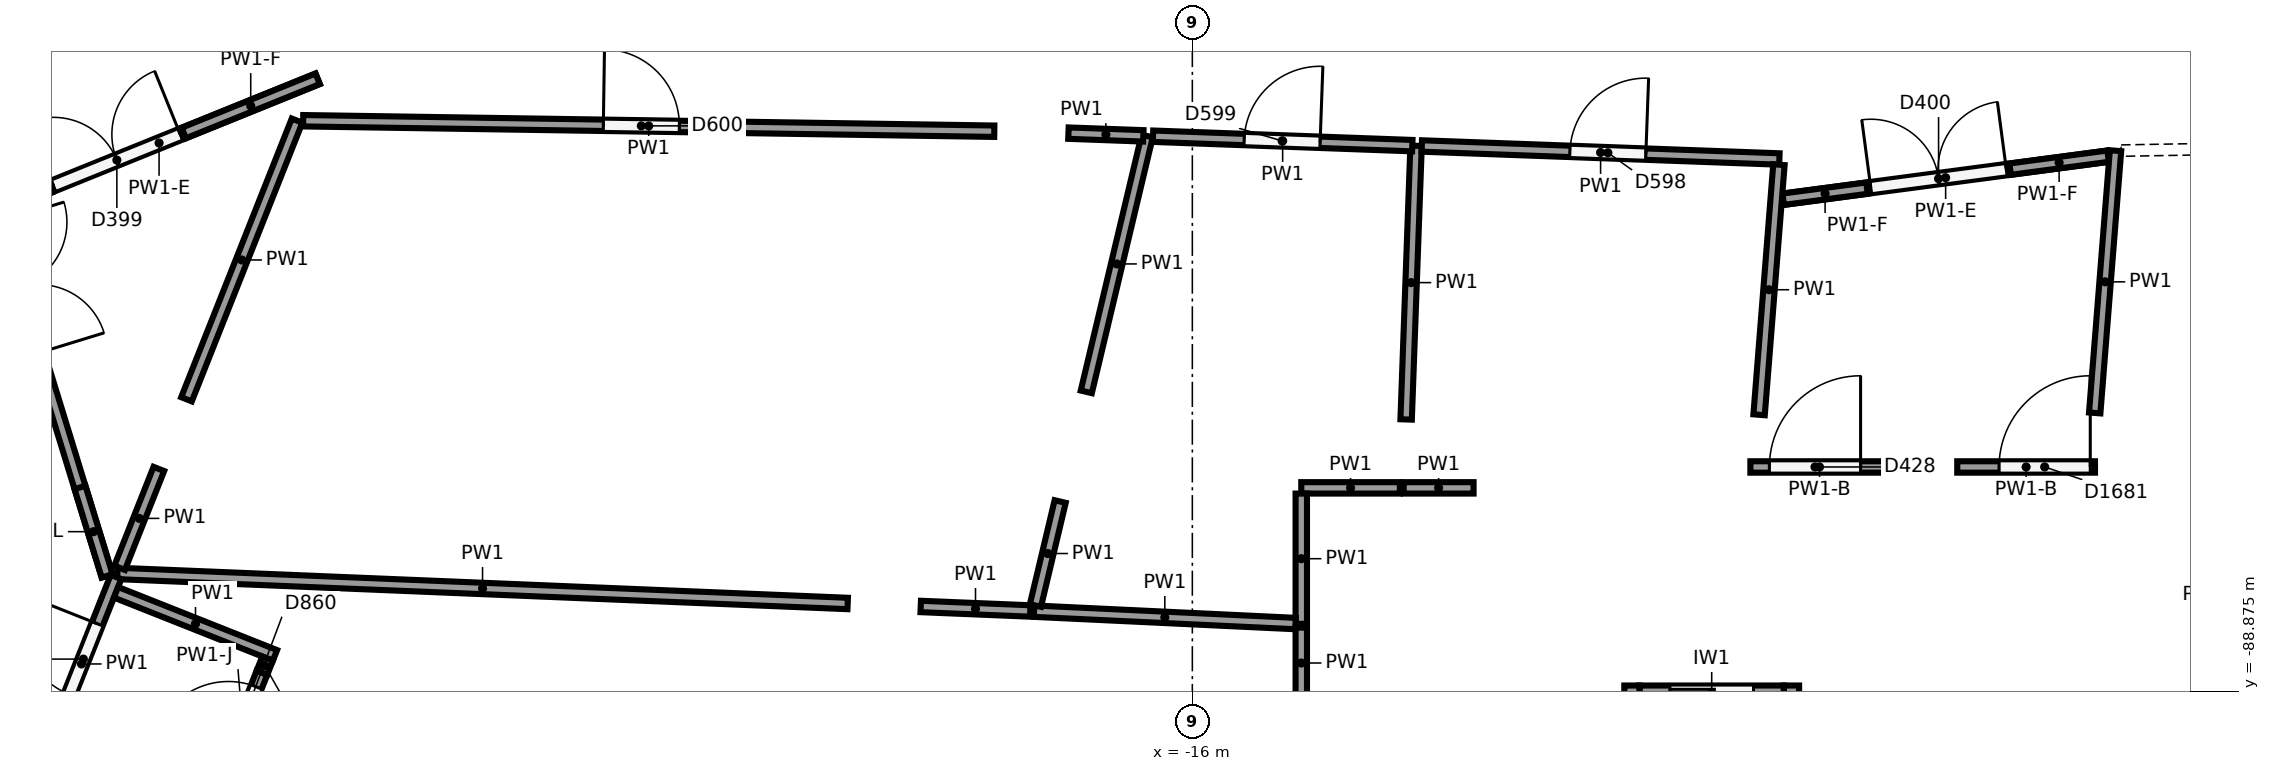
"""IFC4 building model, lengths in metres.
Left out: names, types, materials, properties, quantities, classifications, styles, units other than length and angle.
Written with IfcOpenShell. Run it as: python <this file> out.ifc"""

import sys

from ifc_helpers import new_model, si_unit, direction, frame, frame_2d, origin, origin_2d, place, context, subcontext, project, spatial, rectangle, circle, extrude, element, fill, save


model = new_model("IFC4")
c1 = context("Model", 3, precision=1e-05, world=origin(), true_north=direction((0.0, 1.0)))
c2 = subcontext(c1, "Body", "Model", "MODEL_VIEW")
j1 = project(units=[si_unit("LENGTHUNIT", "METRE"), si_unit("PLANEANGLEUNIT", "RADIAN")], contexts=[c1])
p1 = place(None, origin())
s1 = spatial("IfcSite", under=j1, at=p1, CompositionType="ELEMENT")
p2 = place(p1, origin())
s2 = spatial("IfcBuilding", under=s1, at=p2, CompositionType="ELEMENT")
p3 = place(p2, origin())
s3 = spatial("IfcBuildingStorey", under=s2, at=p3, CompositionType="ELEMENT", Elevation=0.0)
for number, where, z_axis, x_axis in (
    (1, (-19.119, -85.698, 0.0), (0.0, 0.0, 1.0), (1.0, 0.0, 0.0)),
    (2, (-6.387, -85.877, 0.0), (0.0, 0.0, 1.0), (1.0, 0.0, 0.0)),
):
    element("IfcColumn", number, at=place(p3, frame(where, z_axis=z_axis, x_axis=x_axis)), inside=s3, PredefinedType="COLUMN", context=c2, shape_type="SweptSolid", body=[
        extrude(circle(Radius=0.4, at=origin_2d()), origin(), (0.0, 0.0, 1.0), 6.5),
    ])
for number, where, z_axis, x_axis in (
    (3, (-10.217, -91.8, 0.0), (0.0, 0.0, 1.0), (0.0, 1.0, 0.0)),
    (4, (-8.117, -91.8, 0.0), (0.0, 0.0, 1.0), (0.0, 1.0, 0.0)),
):
    element("IfcWall", number, at=place(p3, frame(where, z_axis=z_axis, x_axis=x_axis)), inside=s3, PredefinedType="SHEAR", context=c2, shape_type="SweptSolid", body=[
        extrude(rectangle(XDim=3.0, YDim=0.2, at=frame_2d((1.5, 0.0))), origin(), (0.0, 0.0, 1.0), 6.15),
    ])
p4 = place(p3, frame((-10.117, -88.9, 0.0), z_axis=(0.0, 0.0, 1.0), x_axis=(1.0, 0.0, 0.0)))
e5 = element("IfcWall", 5, at=p4, inside=s3, PredefinedType="SHEAR", context=c2, shape_type="SweptSolid", body=[
    extrude(rectangle(XDim=1.9, YDim=0.2, at=frame_2d((0.95, 0.0))), origin(), (0.0, 0.0, 1.0), 6.15),
])
p5 = place(p4, frame((0.4, 0.0, 0.0)))
e6 = element("IfcOpeningElement", 6, at=p5, cuts=e5, PredefinedType="OPENING", context=c2, shape_type="SweptSolid", body=[
    extrude(rectangle(XDim=1.1, YDim=2.1, at=frame_2d((0.55, 1.05))), frame((0.0, 0.11, 0.0), z_axis=(0.0, -1.0, 0.0), x_axis=(1.0, 0.0, 0.0)), (0.0, 0.0, 1.0), 0.22),
])
p6 = place(p3, frame((-13.187, -85.3, 0.0), z_axis=(0.0, 0.0, 1.0), x_axis=(0.036322391441, 0.999340124222, 0.0)))
e7 = element("IfcWall", 7, at=p6, inside=s3, PredefinedType="PARTITIONING", context=c2, shape_type="SweptSolid", body=[
    extrude(rectangle(XDim=3.603, YDim=0.15, at=frame_2d((1.801, 0.0))), origin(), (0.0, 0.0, 1.0), 6.15),
])
p7 = place(p3, frame((-12.981, -81.702, 0.0), z_axis=(0.0, 0.0, 1.0), x_axis=(0.999339121267, -0.036349975301, 0.0)))
e8 = element("IfcWall", 8, at=p7, inside=s3, PredefinedType="PARTITIONING", context=c2, shape_type="SweptSolid", body=[
    extrude(rectangle(XDim=4.708, YDim=0.15, at=frame_2d((2.354, 0.0))), origin(), (0.0, 0.0, 1.0), 6.15),
])
p8 = place(p7, frame((1.95, 0.0, 0.0)))
e9 = element("IfcOpeningElement", 9, at=p8, cuts=e8, PredefinedType="OPENING", context=c2, shape_type="SweptSolid", body=[
    extrude(rectangle(XDim=1.0, YDim=2.1, at=frame_2d((0.5, 1.05))), frame((0.0, 0.085, 0.0), z_axis=(0.0, -1.0, 0.0), x_axis=(1.0, 0.0, 0.0)), (0.0, 0.0, 1.0), 0.17),
])
p9 = place(p3, frame((-8.282, -81.948, 0.0), z_axis=(0.0, 0.0, 1.0), x_axis=(-0.079066134404, -0.996869372782, 0.0)))
e10 = element("IfcWall", 10, at=p9, inside=s3, PredefinedType="PARTITIONING", context=c2, shape_type="SweptSolid", body=[
    extrude(rectangle(XDim=3.301, YDim=0.15, at=frame_2d((1.65, 0.0))), origin(), (0.0, 0.0, 1.0), 6.15),
])
p10 = place(p3, frame((-12.3, -86.2, 0.0), z_axis=(0.0, 0.0, 1.0), x_axis=(-1.0, 0.0, 0.0)))
e11 = element("IfcWall", 11, at=p10, inside=s3, PredefinedType="PARTITIONING", context=c2, shape_type="SweptSolid", body=[
    extrude(rectangle(XDim=0.92, YDim=0.15, at=frame_2d((0.46, 0.0))), origin(), (0.0, 0.0, 1.0), 6.15),
])
p11 = place(p3, frame((-13.27, -86.2, 0.0), z_axis=(0.0, 0.0, 1.0), x_axis=(-1.0, 0.0, 0.0)))
e12 = element("IfcWall", 12, at=p11, inside=s3, PredefinedType="PARTITIONING", context=c2, shape_type="SweptSolid", body=[
    extrude(rectangle(XDim=1.297, YDim=0.15, at=frame_2d((0.648, 0.0))), origin(), (0.0, 0.0, 1.0), 6.15),
])
p12 = place(p3, frame((-14.567, -86.275, 0.0), z_axis=(0.0, 0.0, 1.0), x_axis=(0.0, -1.0, 0.0)))
e13 = element("IfcWall", 13, at=p12, inside=s3, PredefinedType="PARTITIONING", context=c2, shape_type="SweptSolid", body=[
    extrude(rectangle(XDim=1.714, YDim=0.15, at=frame_2d((0.857, 0.0))), origin(), (0.0, 0.0, 1.0), 6.15),
])
p13 = place(p3, frame((-14.642, -87.985, 0.0), z_axis=(0.0, 0.0, 1.0), x_axis=(-0.998882044853, 0.047272195538, 0.0)))
e14 = element("IfcWall", 14, at=p13, inside=s3, PredefinedType="PARTITIONING", context=c2, shape_type="SweptSolid", body=[
    extrude(rectangle(XDim=3.445, YDim=0.15, at=frame_2d((1.722, 0.0))), origin(), (0.0, 0.0, 1.0), 6.15),
])
p14 = place(p3, frame((-18.065, -87.748, 0.0), z_axis=(0.0, 0.0, 1.0), x_axis=(0.231534489268, 0.972826695912, 0.0)))
e15 = element("IfcWall", 15, at=p14, inside=s3, PredefinedType="PARTITIONING", context=c2, shape_type="SweptSolid", body=[
    extrude(rectangle(XDim=1.407, YDim=0.15, at=frame_2d((0.703, 0.0))), origin(), (0.0, 0.0, 1.0), 6.15),
])
p15 = place(p3, frame((-17.396, -84.937, 0.0), z_axis=(0.0, 0.0, 1.0), x_axis=(0.231630065764, 0.972803943575, 0.0)))
e16 = element("IfcWall", 16, at=p15, inside=s3, PredefinedType="PARTITIONING", context=c2, shape_type="SweptSolid", body=[
    extrude(rectangle(XDim=3.46, YDim=0.15, at=frame_2d((1.73, 0.0))), origin(), (0.0, 0.0, 1.0), 6.15),
])
p16 = place(p3, frame((-16.518, -81.573, 0.0), z_axis=(0.0, 0.0, 1.0), x_axis=(0.999339781254, -0.036331826299, 0.0)))
e17 = element("IfcWall", 17, at=p16, inside=s3, PredefinedType="PARTITIONING", context=c2, shape_type="SweptSolid", body=[
    extrude(rectangle(XDim=3.414, YDim=0.15, at=frame_2d((1.707, 0.0))), origin(), (0.0, 0.0, 1.0), 6.15),
])
p17 = place(p16, frame((1.2, 0.0, 0.0)))
e18 = element("IfcOpeningElement", 18, at=p17, cuts=e17, PredefinedType="OPENING", context=c2, shape_type="SweptSolid", body=[
    extrude(rectangle(XDim=1.0, YDim=2.1, at=frame_2d((0.5, 1.05))), frame((0.0, 0.085, 0.0), z_axis=(0.0, -1.0, 0.0), x_axis=(1.0, 0.0, 0.0)), (0.0, 0.0, 1.0), 0.17),
])
p18 = place(p3, frame((-18.132, -87.82, 0.0), z_axis=(0.0, 0.0, 1.0), x_axis=(-0.999160717518, 0.040961696364, 0.0)))
e19 = element("IfcWall", 19, at=p18, inside=s3, PredefinedType="PARTITIONING", context=c2, shape_type="SweptSolid", body=[
    extrude(rectangle(XDim=1.442, YDim=0.15, at=frame_2d((0.721, 0.0))), origin(), (0.0, 0.0, 1.0), 6.15),
])
p19 = place(p3, frame((-20.534, -87.721, 0.0), z_axis=(0.0, 0.0, 1.0), x_axis=(-0.999155019023, 0.041100461807, 0.0)))
e20 = element("IfcWall", 20, at=p19, inside=s3, PredefinedType="PARTITIONING", context=c2, shape_type="SweptSolid", body=[
    extrude(rectangle(XDim=9.617, YDim=0.15, at=frame_2d((4.809, 0.0))), origin(), (0.0, 0.0, 1.0), 6.15),
])
p20 = place(p3, frame((-30.114, -87.252, 0.0), z_axis=(0.0, 0.0, 1.0), x_axis=(0.36874266044, 0.929531521989, 0.0)))
e21 = element("IfcWall", 21, at=p20, inside=s3, PredefinedType="PARTITIONING", context=c2, shape_type="SweptSolid", body=[
    extrude(rectangle(XDim=1.4, YDim=0.15, at=frame_2d((0.7, 0.0))), origin(), (0.0, 0.0, 1.0), 6.15),
])
p21 = place(p3, frame((-29.234, -85.035, 0.0), z_axis=(0.0, 0.0, 1.0), x_axis=(0.368859950934, 0.9294849846, 0.0)))
e22 = element("IfcWall", 22, at=p21, inside=s3, PredefinedType="PARTITIONING", context=c2, shape_type="SweptSolid", body=[
    extrude(rectangle(XDim=3.944, YDim=0.15, at=frame_2d((1.972, 0.0))), origin(), (0.0, 0.0, 1.0), 6.15),
])
p22 = place(p3, frame((-27.699, -81.37, 0.0), z_axis=(0.0, 0.0, 1.0), x_axis=(0.999884976641, -0.015166854913, 0.0)))
e23 = element("IfcWall", 23, at=p22, inside=s3, PredefinedType="PARTITIONING", context=c2, shape_type="SweptSolid", body=[
    extrude(rectangle(XDim=9.095, YDim=0.15, at=frame_2d((4.547, 0.0))), origin(), (0.0, 0.0, 1.0), 6.15),
])
p23 = place(p22, frame((3.95, 0.0, 0.0)))
e24 = element("IfcOpeningElement", 24, at=p23, cuts=e23, PredefinedType="OPENING", context=c2, shape_type="SweptSolid", body=[
    extrude(rectangle(XDim=1.0, YDim=2.1, at=frame_2d((0.5, 1.05))), frame((0.0, 0.085, 0.0), z_axis=(0.0, -1.0, 0.0), x_axis=(1.0, 0.0, 0.0)), (0.0, 0.0, 1.0), 0.17),
])
p24 = place(p3, frame((-17.63, -81.533, 0.0), z_axis=(0.0, 0.0, 1.0), x_axis=(0.999346023041, -0.036159732184, 0.0)))
e25 = element("IfcWall", 25, at=p24, inside=s3, PredefinedType="PARTITIONING", context=c2, shape_type="SweptSolid", body=[
    extrude(rectangle(XDim=0.986, YDim=0.15, at=frame_2d((0.493, 0.0))), origin(), (0.0, 0.0, 1.0), 6.15),
])
p25 = place(p3, frame((-31.07, -89.661, 0.0), z_axis=(0.0, 0.0, 1.0), x_axis=(0.368859118019, 0.929485315137, 0.0)))
e26 = element("IfcWall", 26, at=p25, inside=s3, PredefinedType="PARTITIONING", context=c2, shape_type="SweptSolid", body=[
    extrude(rectangle(XDim=2.462, YDim=0.15, at=frame_2d((1.231, 0.0))), origin(), (0.0, 0.0, 1.0), 6.15),
])
p26 = place(p25, frame((0.8, 0.0, 0.0)))
e27 = element("IfcOpeningElement", 27, at=p26, cuts=e26, PredefinedType="OPENING", context=c2, shape_type="SweptSolid", body=[
    extrude(rectangle(XDim=1.0, YDim=2.1, at=frame_2d((0.5, 1.05))), frame((0.0, 0.085, 0.0), z_axis=(0.0, -1.0, 0.0), x_axis=(1.0, 0.0, 0.0)), (0.0, 0.0, 1.0), 0.17),
])
p27 = place(p3, frame((-14.567, -88.039, 0.0), z_axis=(0.0, 0.0, 1.0), x_axis=(0.0, -1.0, 0.0)))
e28 = element("IfcWall", 28, at=p27, inside=s3, PredefinedType="PARTITIONING", context=c2, shape_type="SweptSolid", body=[
    extrude(rectangle(XDim=0.931, YDim=0.15, at=frame_2d((0.466, 0.0))), origin(), (0.0, 0.0, 1.0), 6.15),
])
p28 = place(p3, frame((-4.127, -85.214, 0.0), z_axis=(0.0, 0.0, 1.0), x_axis=(0.079080692969, 0.99686821797, 0.0)))
e29 = element("IfcWall", 29, at=p28, inside=s3, PredefinedType="PARTITIONING", context=c2, shape_type="SweptSolid", body=[
    extrude(rectangle(XDim=3.461, YDim=0.15, at=frame_2d((1.73, 0.0))), origin(), (0.0, 0.0, 1.0), 6.15),
])
p29 = place(p3, frame((-3.778, -81.763, 0.0), z_axis=(0.0, 0.0, 1.0), x_axis=(0.999845432781, 0.017581539953, 0.0)))
e30 = element("IfcWall", 30, at=p29, inside=s3, PredefinedType="PARTITIONING", context=c2, shape_type="SweptSolid", body=[
    extrude(rectangle(XDim=9.332, YDim=0.15, at=frame_2d((4.666, 0.0))), origin(), (0.0, 0.0, 1.0), 6.15),
])
p30 = place(p29, frame((4.2, 0.0, 0.0)))
e31 = element("IfcOpeningElement", 31, at=p30, cuts=e30, PredefinedType="OPENING", context=c2, shape_type="SweptSolid", body=[
    extrude(rectangle(XDim=1.0, YDim=2.1, at=frame_2d((0.5, 1.05))), frame((0.0, 0.085, 0.0), z_axis=(0.0, -1.0, 0.0), x_axis=(1.0, 0.0, 0.0)), (0.0, 0.0, 1.0), 0.17),
])
p31 = place(p3, frame((-30.161, -87.574, 0.0), z_axis=(0.0, 0.0, 1.0), x_axis=(0.929535584053, -0.368732420571, 0.0)))
e32 = element("IfcWall", 32, at=p31, inside=s3, PredefinedType="PARTITIONING", context=c2, shape_type="SweptSolid", body=[
    extrude(rectangle(XDim=2.25, YDim=0.15, at=frame_2d((1.125, 0.0))), origin(), (0.0, 0.0, 1.0), 6.15),
])
p32 = place(p3, frame((-28.757, -89.933, 0.0), z_axis=(0.0, 0.0, 1.0), x_axis=(0.368833562796, 0.929495456124, 0.0)))
e33 = element("IfcWall", 33, at=p32, inside=s3, PredefinedType="PARTITIONING", context=c2, shape_type="SweptSolid", body=[
    extrude(rectangle(XDim=1.4, YDim=0.15, at=frame_2d((0.7, 0.0))), origin(), (0.0, 0.0, 1.0), 5.05),
])
p33 = place(p32, frame((0.2, 0.0, 0.0)))
e34 = element("IfcOpeningElement", 34, at=p33, cuts=e33, PredefinedType="OPENING", context=c2, shape_type="SweptSolid", body=[
    extrude(rectangle(XDim=1.0, YDim=2.1, at=frame_2d((0.5, 1.05))), frame((0.0, 0.085, 0.0), z_axis=(0.0, -1.0, 0.0), x_axis=(1.0, 0.0, 0.0)), (0.0, 0.0, 1.0), 0.17),
])
p34 = place(p3, frame((-28.241, -88.632, 0.0), z_axis=(0.0, 0.0, 1.0), x_axis=(0.368862269938, 0.929484064315, 0.0)))
e35 = element("IfcWall", 35, at=p34, inside=s3, PredefinedType="PARTITIONING", context=c2, shape_type="SweptSolid", body=[
    extrude(rectangle(XDim=0.2, YDim=0.15, at=frame_2d((0.1, 0.0))), origin(), (0.0, 0.0, 1.0), 6.15),
])
p35 = place(p3, frame((-32.074, -81.509, 0.0), z_axis=(0.0, 0.0, 1.0), x_axis=(0.293525002097, -0.955951396852, 0.0)))
e36 = element("IfcWall", 36, at=p35, inside=s3, PredefinedType="PARTITIONING", context=c2, shape_type="SweptSolid", body=[
    extrude(rectangle(XDim=6.118, YDim=0.15, at=frame_2d((3.059, 0.0))), origin(), (0.0, 0.0, 1.0), 4.85),
])
p36 = place(p35, frame((1.25, 0.0, 0.0)))
e37 = element("IfcOpeningElement", 37, at=p36, cuts=e36, PredefinedType="OPENING", context=c2, shape_type="SweptSolid", body=[
    extrude(rectangle(XDim=1.8, YDim=2.1, at=frame_2d((0.9, 1.05))), frame((0.0, 0.085, 0.0), z_axis=(0.0, -1.0, 0.0), x_axis=(1.0, 0.0, 0.0)), (0.0, 0.0, 1.0), 0.17),
])
p37 = place(p3, frame((-30.635, -86.195, 4.85), z_axis=(0.0, 0.0, 1.0), x_axis=(0.293507791135, -0.955956681311, 0.0)))
e38 = element("IfcWall", 38, at=p37, inside=s3, PredefinedType="PARTITIONING", context=c2, shape_type="SweptSolid", body=[
    extrude(rectangle(XDim=1.217, YDim=0.15, at=frame_2d((0.608, 0.0))), origin(), (0.0, 0.0, 1.0), 1.3),
])
p38 = place(p3, frame((-31.681, -82.507, 0.0), z_axis=(0.0, 0.0, 1.0), x_axis=(0.926969266013, 0.375137281361, 0.0)))
e39 = element("IfcWall", 39, at=p38, inside=s3, PredefinedType="PARTITIONING", context=c2, shape_type="SweptSolid", body=[
    extrude(rectangle(XDim=4.502, YDim=0.15, at=frame_2d((2.251, 0.0))), origin(), (0.0, 0.0, 1.0), 5.25),
])
p39 = place(p38, frame((0.752, 0.0, 0.0)))
e40 = element("IfcOpeningElement", 40, at=p39, cuts=e39, PredefinedType="OPENING", context=c2, shape_type="SweptSolid", body=[
    extrude(rectangle(XDim=1.8, YDim=2.1, at=frame_2d((0.9, 1.05))), frame((0.0, 0.085, 0.0), z_axis=(0.0, -1.0, 0.0), x_axis=(1.0, 0.0, 0.0)), (0.0, 0.0, 1.0), 0.17),
])
p40 = place(p3, frame((-29.27, -81.531, 5.25), z_axis=(0.0, 0.0, 1.0), x_axis=(0.926944685228, 0.375198015091, 0.0)))
e41 = element("IfcWall", 41, at=p40, inside=s3, PredefinedType="PARTITIONING", context=c2, shape_type="SweptSolid", body=[
    extrude(rectangle(XDim=1.9, YDim=0.15, at=frame_2d((0.95, 0.0))), origin(), (0.0, 0.0, 1.0), 0.9),
])
p41 = place(p3, frame((-8.658, -85.925, 0.0), z_axis=(0.0, 0.0, 1.0), x_axis=(1.0, 0.0, 0.0)))
e42 = element("IfcWall", 42, at=p41, inside=s3, PredefinedType="PARTITIONING", context=c2, shape_type="SweptSolid", body=[
    extrude(rectangle(XDim=1.82, YDim=0.15, at=frame_2d((0.91, 0.0))), origin(), (0.0, 0.0, 1.0), 4.85),
])
p42 = place(p41, frame((0.25, 0.0, 0.0)))
e43 = element("IfcOpeningElement", 43, at=p42, cuts=e42, PredefinedType="OPENING", context=c2, shape_type="SweptSolid", body=[
    extrude(rectangle(XDim=1.2, YDim=2.1, at=frame_2d((0.6, 1.05))), frame((0.0, 0.085, 0.0), z_axis=(0.0, -1.0, 0.0), x_axis=(1.0, 0.0, 0.0)), (0.0, 0.0, 1.0), 0.17),
])
p43 = place(p3, frame((-5.936, -85.925, 0.0), z_axis=(0.0, 0.0, 1.0), x_axis=(1.0, 0.0, 0.0)))
e44 = element("IfcWall", 44, at=p43, inside=s3, PredefinedType="PARTITIONING", context=c2, shape_type="SweptSolid", body=[
    extrude(rectangle(XDim=1.812, YDim=0.15, at=frame_2d((0.906, 0.0))), origin(), (0.0, 0.0, 1.0), 4.85),
])
p44 = place(p43, frame((0.55, 0.0, 0.0)))
e45 = element("IfcOpeningElement", 45, at=p44, cuts=e44, PredefinedType="OPENING", context=c2, shape_type="SweptSolid", body=[
    extrude(rectangle(XDim=1.2, YDim=2.1, at=frame_2d((0.6, 1.05))), frame((0.0, 0.085, 0.0), z_axis=(0.0, -1.0, 0.0), x_axis=(1.0, 0.0, 0.0)), (0.0, 0.0, 1.0), 0.17),
])
p45 = place(p3, frame((-8.226, -82.403, 0.0), z_axis=(0.0, 0.0, 1.0), x_axis=(0.991336345684, 0.131347819645, 0.0)))
e46 = element("IfcWall", 46, at=p45, inside=s3, PredefinedType="PARTITIONING", context=c2, shape_type="SweptSolid", body=[
    extrude(rectangle(XDim=4.312, YDim=0.15, at=frame_2d((2.156, 0.0))), origin(), (0.0, 0.0, 1.0), 5.25),
])
p46 = place(p45, frame((1.162, 0.0, 0.0)))
e47 = element("IfcOpeningElement", 47, at=p46, cuts=e46, PredefinedType="OPENING", context=c2, shape_type="SweptSolid", body=[
    extrude(rectangle(XDim=1.8, YDim=2.1, at=frame_2d((0.9, 1.05))), frame((0.0, 0.085, 0.0), z_axis=(0.0, -1.0, 0.0), x_axis=(1.0, 0.0, 0.0)), (0.0, 0.0, 1.0), 0.17),
])
p47 = place(p3, frame((-5.24, -82.007, 5.25), z_axis=(0.0, 0.0, 1.0), x_axis=(0.991343984125, 0.131290156291, 0.0)))
e48 = element("IfcWall", 48, at=p47, inside=s3, PredefinedType="PARTITIONING", context=c2, shape_type="SweptSolid", body=[
    extrude(rectangle(XDim=1.3, YDim=0.15, at=frame_2d((0.65, 0.0))), origin(), (0.0, 0.0, 1.0), 0.9),
])
p48 = place(p3, frame((-8.226, -82.403, 5.25), z_axis=(0.0, 0.0, 1.0), x_axis=(0.991350147391, 0.131243610392, 0.0)))
e49 = element("IfcWall", 49, at=p48, inside=s3, PredefinedType="PARTITIONING", context=c2, shape_type="SweptSolid", body=[
    extrude(rectangle(XDim=1.112, YDim=0.15, at=frame_2d((0.556, 0.0))), origin(), (0.0, 0.0, 1.0), 0.9),
])
p49 = place(p5, origin())
e50 = element("IfcDoor", 50, at=p49, inside=s3, OperationType="SLIDING_TO_RIGHT", PredefinedType="DOOR", context=c2, shape_type="SweptSolid", body=[
    extrude(rectangle(XDim=1.1, YDim=2.1, at=frame_2d((0.55, 1.05))), frame((0.0, 0.025, 0.0), z_axis=(0.0, -1.0, 0.0), x_axis=(1.0, 0.0, 0.0)), (0.0, 0.0, 1.0), 0.05),
])
fill(e6, e50)
p50 = place(p8, origin())
e51 = element("IfcDoor", 51, at=p50, inside=s3, OperationType="SINGLE_SWING_RIGHT", PredefinedType="DOOR", context=c2, shape_type="SweptSolid", body=[
    extrude(rectangle(XDim=1.0, YDim=2.1, at=frame_2d((0.5, 1.05))), frame((0.0, 0.025, 0.0), z_axis=(0.0, -1.0, 0.0), x_axis=(1.0, 0.0, 0.0)), (0.0, 0.0, 1.0), 0.05),
])
fill(e9, e51)
p51 = place(p17, origin())
e52 = element("IfcDoor", 52, at=p51, inside=s3, OperationType="SINGLE_SWING_RIGHT", PredefinedType="DOOR", context=c2, shape_type="SweptSolid", body=[
    extrude(rectangle(XDim=1.0, YDim=2.1, at=frame_2d((0.5, 1.05))), frame((0.0, 0.025, 0.0), z_axis=(0.0, -1.0, 0.0), x_axis=(1.0, 0.0, 0.0)), (0.0, 0.0, 1.0), 0.05),
])
fill(e18, e52)
p52 = place(p23, origin())
e53 = element("IfcDoor", 53, at=p52, inside=s3, OperationType="SINGLE_SWING_LEFT", PredefinedType="DOOR", context=c2, shape_type="SweptSolid", body=[
    extrude(rectangle(XDim=1.0, YDim=2.1, at=frame_2d((0.5, 1.05))), frame((0.0, 0.025, 0.0), z_axis=(0.0, -1.0, 0.0), x_axis=(1.0, 0.0, 0.0)), (0.0, 0.0, 1.0), 0.05),
])
fill(e24, e53)
p53 = place(p26, origin())
e54 = element("IfcDoor", 54, at=p53, inside=s3, OperationType="SINGLE_SWING_RIGHT", PredefinedType="DOOR", context=c2, shape_type="SweptSolid", body=[
    extrude(rectangle(XDim=1.0, YDim=2.1, at=frame_2d((0.5, 1.05))), frame((0.0, 0.025, 0.0), z_axis=(0.0, -1.0, 0.0), x_axis=(1.0, 0.0, 0.0)), (0.0, 0.0, 1.0), 0.05),
])
fill(e27, e54)
p54 = place(p33, origin())
e55 = element("IfcDoor", 55, at=p54, inside=s3, OperationType="SINGLE_SWING_LEFT", PredefinedType="DOOR", context=c2, shape_type="SweptSolid", body=[
    extrude(rectangle(XDim=1.0, YDim=2.1, at=frame_2d((0.5, 1.05))), frame((0.0, 0.025, 0.0), z_axis=(0.0, -1.0, 0.0), x_axis=(1.0, 0.0, 0.0)), (0.0, 0.0, 1.0), 0.05),
])
fill(e34, e55)
p55 = place(p39, origin())
e56 = element("IfcDoor", 56, at=p55, inside=s3, OperationType="DOUBLE_DOOR_SINGLE_SWING", PredefinedType="DOOR", context=c2, shape_type="SweptSolid", body=[
    extrude(rectangle(XDim=1.8, YDim=2.1, at=frame_2d((0.9, 1.05))), frame((0.0, 0.025, 0.0), z_axis=(0.0, -1.0, 0.0), x_axis=(1.0, 0.0, 0.0)), (0.0, 0.0, 1.0), 0.05),
])
fill(e40, e56)
p56 = place(p42, origin())
e57 = element("IfcDoor", 57, at=p56, inside=s3, OperationType="SINGLE_SWING_RIGHT", PredefinedType="DOOR", context=c2, shape_type="SweptSolid", body=[
    extrude(rectangle(XDim=1.2, YDim=2.1, at=frame_2d((0.6, 1.05))), frame((0.0, 0.025, 0.0), z_axis=(0.0, -1.0, 0.0), x_axis=(1.0, 0.0, 0.0)), (0.0, 0.0, 1.0), 0.05),
])
fill(e43, e57)
p57 = place(p44, origin())
e58 = element("IfcDoor", 58, at=p57, inside=s3, OperationType="SINGLE_SWING_RIGHT", PredefinedType="DOOR", context=c2, shape_type="SweptSolid", body=[
    extrude(rectangle(XDim=1.2, YDim=2.1, at=frame_2d((0.6, 1.05))), frame((0.0, 0.025, 0.0), z_axis=(0.0, -1.0, 0.0), x_axis=(1.0, 0.0, 0.0)), (0.0, 0.0, 1.0), 0.05),
])
fill(e45, e58)
p58 = place(p46, origin())
e59 = element("IfcDoor", 59, at=p58, inside=s3, OperationType="DOUBLE_DOOR_SINGLE_SWING", PredefinedType="DOOR", context=c2, shape_type="SweptSolid", body=[
    extrude(rectangle(XDim=1.8, YDim=2.1, at=frame_2d((0.9, 1.05))), frame((0.0, 0.025, 0.0), z_axis=(0.0, -1.0, 0.0), x_axis=(1.0, 0.0, 0.0)), (0.0, 0.0, 1.0), 0.05),
])
fill(e47, e59)
save(model, sys.argv[1])
